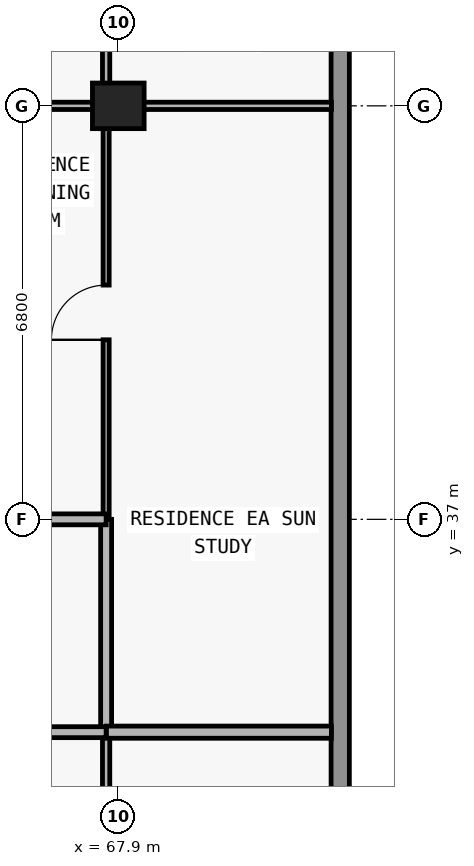
"""IFC4 building model, lengths in metres.
Left out: names, types, materials, properties, quantities, classifications, styles, units other than length and angle.
Written with IfcOpenShell. Run it as: python <this file> out.ifc"""

import sys

from ifc_helpers import new_model, si_unit, direction, frame, frame_2d, origin, origin_2d, place, context, subcontext, project, spatial, rectangle, extrude, element, fill, save


model = new_model("IFC4")
c1 = context("Model", 3, precision=1e-05, world=origin(), true_north=direction((0.0, 1.0)))
c2 = subcontext(c1, "Body", "Model", "MODEL_VIEW")
j1 = project(units=[si_unit("LENGTHUNIT", "METRE"), si_unit("PLANEANGLEUNIT", "RADIAN")], contexts=[c1])
p1 = place(None, origin())
s1 = spatial("IfcSite", under=j1, at=p1, CompositionType="ELEMENT")
p2 = place(p1, origin())
s2 = spatial("IfcBuilding", under=s1, at=p2, CompositionType="ELEMENT")
p3 = place(p2, frame((0.0, 0.0, 191.7)))
s3 = spatial("IfcBuildingStorey", under=s2, at=p3, CompositionType="ELEMENT", Elevation=191.7)
p4 = place(p3, frame((67.9, 43.8, 0.0), z_axis=(0.0, 0.0, 1.0), x_axis=(1.0, 0.0, 0.0)))
e1 = element("IfcColumn", 1, at=p4, inside=s3, PredefinedType="COLUMN", context=c2, shape_type="SweptSolid", body=[
    extrude(rectangle(XDim=0.85, YDim=0.75, at=origin_2d()), origin(), (0.0, 0.0, 1.0), 3.05),
])
p5 = place(p3, frame((71.55, 47.0, 0.0), z_axis=(0.0, 0.0, 1.0), x_axis=(0.0, -1.0, 0.0)))
e2 = element("IfcWall", 2, at=p5, inside=s3, PredefinedType="STANDARD", context=c2, shape_type="SweptSolid", body=[
    extrude(rectangle(XDim=17.9, YDim=0.3, at=frame_2d((8.95, 0.0))), origin(), (0.0, 0.0, 1.0), 3.05),
])
p6 = place(p3, frame((67.7, 27.18, 0.0), z_axis=(0.0, 0.0, 1.0), x_axis=(0.0, 1.0, 0.0)))
e3 = element("IfcWall", 3, at=p6, inside=s3, PredefinedType="PARTITIONING", context=c2, shape_type="SweptSolid", body=[
    extrude(rectangle(XDim=6.32, YDim=0.12, at=frame_2d((3.16, 0.0))), origin(), (0.0, 0.0, 1.0), 2.263),
])
p7 = place(p3, frame((67.7, 33.505, 0.0), z_axis=(0.0, 0.0, 1.0), x_axis=(0.0, 1.0, 0.0)))
e4 = element("IfcWall", 4, at=p7, inside=s3, PredefinedType="PARTITIONING", context=c2, shape_type="SweptSolid", body=[
    extrude(rectangle(XDim=3.495, YDim=0.18, at=frame_2d((1.748, 0.0))), origin(), (0.0, 0.0, 1.0), 2.263),
])
p8 = place(p3, frame((67.7, 37.005, 0.0), z_axis=(0.0, 0.0, 1.0), x_axis=(0.0, 1.0, 0.0)))
e5 = element("IfcWall", 5, at=p8, inside=s3, PredefinedType="MOVABLE", context=c2, shape_type="SweptSolid", body=[
    extrude(rectangle(XDim=6.795, YDim=0.1, at=frame_2d((3.397, 0.0))), origin(), (0.0, 0.0, 1.0), 2.263),
])
p9 = place(p8, frame((2.948, 0.0, 0.0)))
e6 = element("IfcOpeningElement", 6, at=p9, cuts=e5, PredefinedType="OPENING", context=c2, shape_type="SweptSolid", body=[
    extrude(rectangle(XDim=0.9, YDim=2.15, at=frame_2d((0.45, 1.075))), frame((0.0, 0.06, 0.0), z_axis=(0.0, -1.0, 0.0), x_axis=(1.0, 0.0, 0.0)), (0.0, 0.0, 1.0), 0.12),
])
p10 = place(p3, frame((67.7, 43.805, 0.0), z_axis=(0.0, 0.0, 1.0), x_axis=(0.0, 1.0, 0.0)))
e7 = element("IfcWall", 7, at=p10, inside=s3, PredefinedType="PARTITIONING", context=c2, shape_type="SweptSolid", body=[
    extrude(rectangle(XDim=3.075, YDim=0.12, at=frame_2d((1.538, 0.0))), origin(), (0.0, 0.0, 1.0), 3.05),
])
p11 = place(p10, frame((1.087, 0.0, 0.0)))
e8 = element("IfcOpeningElement", 8, at=p11, cuts=e7, PredefinedType="OPENING", context=c2, shape_type="SweptSolid", body=[
    extrude(rectangle(XDim=0.9, YDim=2.15, at=frame_2d((0.45, 1.075))), frame((0.0, 0.07, 0.0), z_axis=(0.0, -1.0, 0.0), x_axis=(1.0, 0.0, 0.0)), (0.0, 0.0, 1.0), 0.14),
])
p12 = place(p3, frame((31.4, 33.5, 0.0), z_axis=(0.0, 0.0, 1.0), x_axis=(1.0, 0.0, 0.0)))
e9 = element("IfcWall", 9, at=p12, inside=s3, PredefinedType="PARTITIONING", context=c2, shape_type="SweptSolid", body=[
    extrude(rectangle(XDim=36.3, YDim=0.18, at=frame_2d((18.15, 0.0))), origin(), (0.0, 0.0, 1.0), 3.05),
])
p13 = place(p12, frame((6.231, 0.0, 0.0)))
e10 = element("IfcOpeningElement", 10, at=p13, cuts=e9, PredefinedType="OPENING", context=c2, shape_type="SweptSolid", body=[
    extrude(rectangle(XDim=1.0, YDim=2.2, at=frame_2d((0.5, 1.1))), frame((0.0, 0.1, 0.0), z_axis=(0.0, -1.0, 0.0), x_axis=(1.0, 0.0, 0.0)), (0.0, 0.0, 1.0), 0.2),
])
p14 = place(p12, frame((22.575, 0.0, 0.0)))
e11 = element("IfcOpeningElement", 11, at=p14, cuts=e9, PredefinedType="OPENING", context=c2, shape_type="SweptSolid", body=[
    extrude(rectangle(XDim=1.0, YDim=2.2, at=frame_2d((0.5, 1.1))), frame((0.0, 0.1, 0.0), z_axis=(0.0, -1.0, 0.0), x_axis=(1.0, 0.0, 0.0)), (0.0, 0.0, 1.0), 0.2),
])
p15 = place(p12, frame((30.875, 0.0, 0.0)))
e12 = element("IfcOpeningElement", 12, at=p15, cuts=e9, PredefinedType="OPENING", context=c2, shape_type="SweptSolid", body=[
    extrude(rectangle(XDim=1.0, YDim=2.2, at=frame_2d((0.5, 1.1))), frame((0.0, 0.1, 0.0), z_axis=(0.0, -1.0, 0.0), x_axis=(1.0, 0.0, 0.0)), (0.0, 0.0, 1.0), 0.2),
])
p16 = place(p3, frame((67.705, 33.5, 0.0), z_axis=(0.0, 0.0, 1.0), x_axis=(1.0, 0.0, 0.0)))
e13 = element("IfcWall", 13, at=p16, inside=s3, PredefinedType="PARTITIONING", context=c2, shape_type="SweptSolid", body=[
    extrude(rectangle(XDim=3.7, YDim=0.2, at=frame_2d((1.85, 0.0))), origin(), (0.0, 0.0, 1.0), 3.05),
])
p17 = place(p3, frame((59.855, 37.0, 0.0), z_axis=(0.0, 0.0, 1.0), x_axis=(1.0, 0.0, 0.0)))
e14 = element("IfcWall", 14, at=p17, inside=s3, PredefinedType="PARTITIONING", context=c2, shape_type="SweptSolid", body=[
    extrude(rectangle(XDim=7.845, YDim=0.18, at=frame_2d((3.922, 0.0))), origin(), (0.0, 0.0, 1.0), 3.05),
])
p18 = place(p17, frame((3.349, 0.0, 0.0)))
e15 = element("IfcOpeningElement", 15, at=p18, cuts=e14, PredefinedType="OPENING", context=c2, shape_type="SweptSolid", body=[
    extrude(rectangle(XDim=1.0, YDim=2.2, at=frame_2d((0.5, 1.1))), frame((0.0, 0.1, 0.0), z_axis=(0.0, -1.0, 0.0), x_axis=(1.0, 0.0, 0.0)), (0.0, 0.0, 1.0), 0.2),
])
p19 = place(p3, frame((59.845, 43.8, 0.0), z_axis=(0.0, 0.0, 1.0), x_axis=(1.0, 0.0, 0.0)))
e16 = element("IfcWall", 16, at=p19, inside=s3, PredefinedType="PARTITIONING", context=c2, shape_type="SweptSolid", body=[
    extrude(rectangle(XDim=11.56, YDim=0.12, at=frame_2d((5.78, 0.0))), origin(), (0.0, 0.0, 1.0), 2.418),
])
p20 = place(p19, frame((3.409, 0.0, 0.0)))
e17 = element("IfcOpeningElement", 17, at=p20, cuts=e16, PredefinedType="OPENING", context=c2, shape_type="SweptSolid", body=[
    extrude(rectangle(XDim=0.9, YDim=2.15, at=frame_2d((0.45, 1.075))), frame((0.0, 0.07, 0.0), z_axis=(0.0, -1.0, 0.0), x_axis=(1.0, 0.0, 0.0)), (0.0, 0.0, 1.0), 0.14),
])
p21 = place(p19, frame((0.728, 0.0, 0.0)))
e18 = element("IfcOpeningElement", 18, at=p21, cuts=e16, PredefinedType="OPENING", context=c2, shape_type="SweptSolid", body=[
    extrude(rectangle(XDim=0.85, YDim=2.1, at=frame_2d((0.425, 1.05))), frame((0.0, 0.07, 0.0), z_axis=(0.0, -1.0, 0.0), x_axis=(1.0, 0.0, 0.0)), (0.0, 0.0, 1.0), 0.14),
])
p22 = place(p9, origin())
e19 = element("IfcDoor", 19, at=p22, inside=s3, OperationType="SINGLE_SWING_LEFT", PredefinedType="DOOR", context=c2, shape_type="SweptSolid", body=[
    extrude(rectangle(XDim=0.9, YDim=2.15, at=frame_2d((0.45, 1.075))), frame((0.0, 0.025, 0.0), z_axis=(0.0, -1.0, 0.0), x_axis=(1.0, 0.0, 0.0)), (0.0, 0.0, 1.0), 0.05),
])
fill(e6, e19)
save(model, sys.argv[1])
